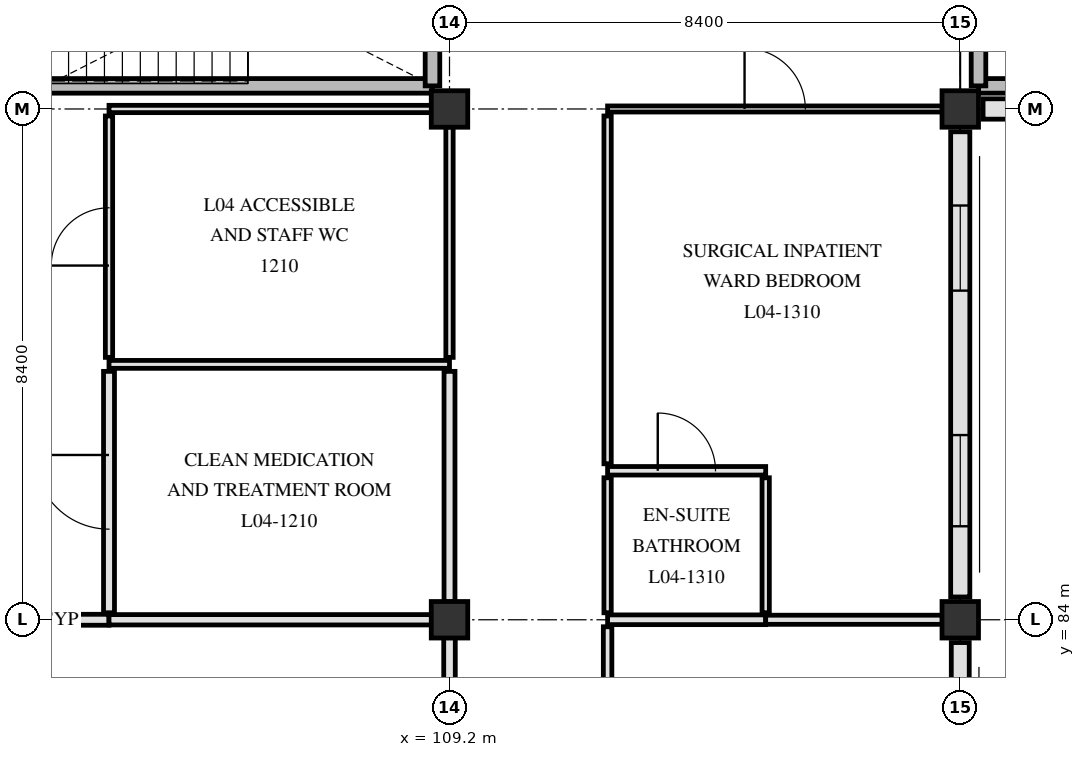
"""IFC4 building model, lengths in metres.
Left out: names, types, materials, properties, quantities, classifications, styles, units other than length and angle.
Written with IfcOpenShell. Run it as: python <this file> out.ifc"""

import sys

from ifc_helpers import new_model, si_unit, direction, frame, frame_2d, origin, origin_2d, place, context, subcontext, project, spatial, rectangle, extrude, element, fill, save


model = new_model("IFC4")
c1 = context("Model", 3, precision=1e-05, world=origin(), true_north=direction((0.0, 1.0)))
c2 = subcontext(c1, "Body", "Model", "MODEL_VIEW")
j1 = project(units=[si_unit("LENGTHUNIT", "METRE"), si_unit("PLANEANGLEUNIT", "RADIAN")], contexts=[c1])
p1 = place(None, origin())
s1 = spatial("IfcSite", under=j1, at=p1, CompositionType="ELEMENT")
p2 = place(p1, origin())
s2 = spatial("IfcBuilding", under=s1, at=p2, CompositionType="ELEMENT")
p3 = place(p2, frame((0.0, 0.0, 18.6)))
s3 = spatial("IfcBuildingStorey", under=s2, at=p3, CompositionType="ELEMENT", Elevation=18.6)
for number, where, z_axis, x_axis in (
    (1, (109.2, 84.0, 0.0), (0.0, 0.0, 1.0), (1.0, 0.0, 0.0)),
    (2, (109.2, 92.4, 0.0), (0.0, 0.0, 1.0), (1.0, 0.0, 0.0)),
    (3, (117.6, 84.0, 0.0), (0.0, 0.0, 1.0), (1.0, 0.0, 0.0)),
    (4, (117.6, 92.4, 0.0), (0.0, 0.0, 1.0), (1.0, 0.0, 0.0)),
):
    element("IfcColumn", number, at=place(p3, frame(where, z_axis=z_axis, x_axis=x_axis)), inside=s3, PredefinedType="COLUMN", context=c2, shape_type="SweptSolid", body=[
        extrude(rectangle(XDim=0.6, YDim=0.6, at=origin_2d()), origin(), (0.0, 0.0, 1.0), 3.9),
    ])
p4 = place(p3, frame((125.625, 92.4, 0.0), z_axis=(0.0, 0.0, 1.0), x_axis=(-1.0, 0.0, 0.0)))
e5 = element("IfcWall", 5, at=p4, inside=s3, PredefinedType="SOLIDWALL", context=c2, shape_type="SweptSolid", body=[
    extrude(rectangle(XDim=7.65, YDim=0.335, at=frame_2d((3.825, 0.0))), origin(), (0.0, 0.0, 1.0), 3.31),
])
p5 = place(p4, frame((1.312, 0.0, 0.85)))
e6 = element("IfcOpeningElement", 6, at=p5, cuts=e5, PredefinedType="OPENING", context=c2, shape_type="SweptSolid", body=[
    extrude(rectangle(XDim=1.2, YDim=1.66, at=frame_2d((0.6, 0.83))), frame((0.0, 0.177, 0.0), z_axis=(0.0, -1.0, 0.0), x_axis=(1.0, 0.0, 0.0)), (0.0, 0.0, 1.0), 0.355),
])
p6 = place(p4, frame((5.087, 0.0, 0.85)))
e7 = element("IfcOpeningElement", 7, at=p6, cuts=e5, PredefinedType="OPENING", context=c2, shape_type="SweptSolid", body=[
    extrude(rectangle(XDim=1.3, YDim=1.66, at=frame_2d((0.65, 0.83))), frame((0.0, 0.177, 0.0), z_axis=(0.0, -1.0, 0.0), x_axis=(1.0, 0.0, 0.0)), (0.0, 0.0, 1.0), 0.355),
])
p7 = place(p3, frame((117.6, 92.025, 0.0), z_axis=(0.0, 0.0, 1.0), x_axis=(0.0, -1.0, 0.0)))
e8 = element("IfcWall", 8, at=p7, inside=s3, PredefinedType="SOLIDWALL", context=c2, shape_type="SweptSolid", body=[
    extrude(rectangle(XDim=7.65, YDim=0.315, at=frame_2d((3.825, 0.0))), origin(), (0.0, 0.0, 1.0), 3.31),
])
p8 = place(p7, frame((1.212, 0.0, 0.85)))
e9 = element("IfcOpeningElement", 9, at=p8, cuts=e8, PredefinedType="OPENING", context=c2, shape_type="SweptSolid", body=[
    extrude(rectangle(XDim=1.4, YDim=1.66, at=frame_2d((0.7, 0.83))), frame((0.0, 0.167, 0.0), z_axis=(0.0, -1.0, 0.0), x_axis=(1.0, 0.0, 0.0)), (0.0, 0.0, 1.0), 0.335),
])
p9 = place(p7, frame((4.988, 0.0, 0.85)))
e10 = element("IfcOpeningElement", 10, at=p9, cuts=e8, PredefinedType="OPENING", context=c2, shape_type="SweptSolid", body=[
    extrude(rectangle(XDim=1.5, YDim=1.66, at=frame_2d((0.75, 0.83))), frame((0.0, 0.167, 0.0), z_axis=(0.0, -1.0, 0.0), x_axis=(1.0, 0.0, 0.0)), (0.0, 0.0, 1.0), 0.335),
])
p10 = place(p3, frame((117.6, 83.625, 0.0), z_axis=(0.0, 0.0, 1.0), x_axis=(0.0, -1.0, 0.0)))
e11 = element("IfcWall", 11, at=p10, inside=s3, PredefinedType="SOLIDWALL", context=c2, shape_type="SweptSolid", body=[
    extrude(rectangle(XDim=7.65, YDim=0.295, at=frame_2d((3.825, 0.0))), origin(), (0.0, 0.0, 1.0), 3.31),
])
p11 = place(p10, frame((1.113, 0.0, 0.85)))
e12 = element("IfcOpeningElement", 12, at=p11, cuts=e11, PredefinedType="OPENING", context=c2, shape_type="SweptSolid", body=[
    extrude(rectangle(XDim=1.6, YDim=1.66, at=frame_2d((0.8, 0.83))), frame((0.0, 0.157, 0.0), z_axis=(0.0, -1.0, 0.0), x_axis=(1.0, 0.0, 0.0)), (0.0, 0.0, 1.0), 0.315),
])
p12 = place(p10, frame((4.887, 0.0, 0.85)))
e13 = element("IfcOpeningElement", 13, at=p12, cuts=e11, PredefinedType="OPENING", context=c2, shape_type="SweptSolid", body=[
    extrude(rectangle(XDim=1.7, YDim=1.66, at=frame_2d((0.85, 0.83))), frame((0.0, 0.157, 0.0), z_axis=(0.0, -1.0, 0.0), x_axis=(1.0, 0.0, 0.0)), (0.0, 0.0, 1.0), 0.315),
])
p13 = place(p3, frame((101.1, 92.78, 0.0), z_axis=(0.0, 0.0, 1.0), x_axis=(1.0, 0.0, 0.0)))
e14 = element("IfcWall", 14, at=p13, inside=s3, PredefinedType="SHEAR", context=c2, shape_type="SweptSolid", body=[
    extrude(rectangle(XDim=7.82, YDim=0.24, at=frame_2d((3.91, 0.0))), origin(), (0.0, 0.0, 1.0), 3.62),
])
p14 = place(p3, frame((108.92, 92.78, 0.0), z_axis=(0.0, 0.0, 1.0), x_axis=(0.0, 1.0, 0.0)))
e15 = element("IfcWall", 15, at=p14, inside=s3, PredefinedType="SHEAR", context=c2, shape_type="SweptSolid", body=[
    extrude(rectangle(XDim=3.32, YDim=0.24, at=frame_2d((1.66, 0.0))), origin(), (0.0, 0.0, 1.0), 3.62),
])
p15 = place(p3, frame((117.9, 92.78, 0.0), z_axis=(0.0, 0.0, 1.0), x_axis=(1.0, 0.0, 0.0)))
e16 = element("IfcWall", 16, at=p15, inside=s3, PredefinedType="SHEAR", context=c2, shape_type="SweptSolid", body=[
    extrude(rectangle(XDim=7.82, YDim=0.24, at=frame_2d((3.91, 0.0))), origin(), (0.0, 0.0, 1.0), 3.62),
])
p16 = place(p3, frame((117.9, 92.78, 0.0), z_axis=(0.0, 0.0, 1.0), x_axis=(0.0, 1.0, 0.0)))
e17 = element("IfcWall", 17, at=p16, inside=s3, PredefinedType="SHEAR", context=c2, shape_type="SweptSolid", body=[
    extrude(rectangle(XDim=3.32, YDim=0.24, at=frame_2d((1.66, 0.0))), origin(), (0.0, 0.0, 1.0), 3.62),
])
p17 = place(p3, frame((101.095, 84.0, 0.0), z_axis=(0.0, 0.0, 1.0), x_axis=(1.0, 0.0, 0.0)))
e18 = element("IfcWall", 18, at=p17, inside=s3, PredefinedType="PARTITIONING", context=c2, shape_type="SweptSolid", body=[
    extrude(rectangle(XDim=2.505, YDim=0.18, at=frame_2d((1.252, 0.0))), origin(), (0.0, 0.0, 1.0), 3.16),
])
p18 = place(p3, frame((103.6, 84.0, 0.0), z_axis=(0.0, 0.0, 1.0), x_axis=(1.0, 0.0, 0.0)))
e19 = element("IfcWall", 19, at=p18, inside=s3, PredefinedType="PARTITIONING", context=c2, shape_type="SweptSolid", body=[
    extrude(rectangle(XDim=5.305, YDim=0.17, at=frame_2d((2.652, 0.0))), origin(), (0.0, 0.0, 1.0), 3.16),
])
p19 = place(p3, frame((111.8, 84.0, 0.0), z_axis=(0.0, 0.0, 1.0), x_axis=(1.0, 0.0, 0.0)))
e20 = element("IfcWall", 20, at=p19, inside=s3, PredefinedType="PARTITIONING", context=c2, shape_type="SweptSolid", body=[
    extrude(rectangle(XDim=2.6, YDim=0.16, at=frame_2d((1.3, 0.0))), origin(), (0.0, 0.0, 1.0), 3.16),
])
p20 = place(p3, frame((114.4, 84.0, 0.0), z_axis=(0.0, 0.0, 1.0), x_axis=(1.0, 0.0, 0.0)))
e21 = element("IfcWall", 21, at=p20, inside=s3, PredefinedType="PARTITIONING", context=c2, shape_type="SweptSolid", body=[
    extrude(rectangle(XDim=2.905, YDim=0.15, at=frame_2d((1.453, 0.0))), origin(), (0.0, 0.0, 1.0), 3.16),
])
p21 = place(p3, frame((111.8, 86.45, 0.0), z_axis=(0.0, 0.0, 1.0), x_axis=(1.0, 0.0, 0.0)))
e22 = element("IfcWall", 22, at=p21, inside=s3, PredefinedType="PARTITIONING", context=c2, shape_type="SweptSolid", body=[
    extrude(rectangle(XDim=2.6, YDim=0.14, at=frame_2d((1.3, 0.0))), origin(), (0.0, 0.0, 1.0), 3.61),
])
p22 = place(p21, frame((0.825, 0.0, 0.0)))
e23 = element("IfcOpeningElement", 23, at=p22, cuts=e22, PredefinedType="OPENING", context=c2, shape_type="SweptSolid", body=[
    extrude(rectangle(XDim=0.95, YDim=2.1, at=frame_2d((0.475, 1.05))), frame((0.0, 0.08, 0.0), z_axis=(0.0, -1.0, 0.0), x_axis=(1.0, 0.0, 0.0)), (0.0, 0.0, 1.0), 0.16),
])
p23 = place(p3, frame((103.6, 88.2, 0.0), z_axis=(0.0, 0.0, 1.0), x_axis=(1.0, 0.0, 0.0)))
e24 = element("IfcWall", 24, at=p23, inside=s3, PredefinedType="PARTITIONING", context=c2, shape_type="SweptSolid", body=[
    extrude(rectangle(XDim=5.6, YDim=0.13, at=frame_2d((2.8, 0.0))), origin(), (0.0, 0.0, 1.0), 3.26),
])
p24 = place(p3, frame((103.6, 92.4, 0.0), z_axis=(0.0, 0.0, 1.0), x_axis=(1.0, 0.0, 0.0)))
e25 = element("IfcWall", 25, at=p24, inside=s3, PredefinedType="PARTITIONING", context=c2, shape_type="SweptSolid", body=[
    extrude(rectangle(XDim=5.305, YDim=0.12, at=frame_2d((2.652, 0.0))), origin(), (0.0, 0.0, 1.0), 3.16),
])
p25 = place(p3, frame((111.8, 92.4, 0.0), z_axis=(0.0, 0.0, 1.0), x_axis=(1.0, 0.0, 0.0)))
e26 = element("IfcWall", 26, at=p25, inside=s3, PredefinedType="PARTITIONING", context=c2, shape_type="SweptSolid", body=[
    extrude(rectangle(XDim=5.505, YDim=0.1, at=frame_2d((2.752, 0.0))), origin(), (0.0, 0.0, 1.0), 3.16),
])
p26 = place(p25, frame((2.252, 0.0, 0.0)))
e27 = element("IfcOpeningElement", 27, at=p26, cuts=e26, PredefinedType="OPENING", context=c2, shape_type="SweptSolid", body=[
    extrude(rectangle(XDim=1.0, YDim=2.15, at=frame_2d((0.5, 1.075))), frame((0.0, 0.06, 0.0), z_axis=(0.0, -1.0, 0.0), x_axis=(1.0, 0.0, 0.0)), (0.0, 0.0, 1.0), 0.12),
])
p27 = place(p3, frame((103.6, 84.115, 0.0), z_axis=(0.0, 0.0, 1.0), x_axis=(0.0, 1.0, 0.0)))
e28 = element("IfcWall", 28, at=p27, inside=s3, PredefinedType="PARTITIONING", context=c2, shape_type="SweptSolid", body=[
    extrude(rectangle(XDim=3.97, YDim=0.18, at=frame_2d((1.985, 0.0))), origin(), (0.0, 0.0, 1.0), 3.31),
])
p28 = place(p27, frame((1.375, 0.0, 0.0)))
e29 = element("IfcOpeningElement", 29, at=p28, cuts=e28, PredefinedType="OPENING", context=c2, shape_type="SweptSolid", body=[
    extrude(rectangle(XDim=1.22, YDim=2.18, at=frame_2d((0.61, 1.09))), frame((0.0, 0.1, 0.0), z_axis=(0.0, -1.0, 0.0), x_axis=(1.0, 0.0, 0.0)), (0.0, 0.0, 1.0), 0.2),
])
p29 = place(p3, frame((103.6, 88.315, 0.0), z_axis=(0.0, 0.0, 1.0), x_axis=(0.0, 1.0, 0.0)))
e30 = element("IfcWall", 30, at=p29, inside=s3, PredefinedType="PARTITIONING", context=c2, shape_type="SweptSolid", body=[
    extrude(rectangle(XDim=3.97, YDim=0.12, at=frame_2d((1.985, 0.0))), origin(), (0.0, 0.0, 1.0), 3.31),
])
p30 = place(p29, frame((1.51, 0.0, 0.0)))
e31 = element("IfcOpeningElement", 31, at=p30, cuts=e30, PredefinedType="OPENING", context=c2, shape_type="SweptSolid", body=[
    extrude(rectangle(XDim=0.95, YDim=2.1, at=frame_2d((0.475, 1.05))), frame((0.0, 0.07, 0.0), z_axis=(0.0, -1.0, 0.0), x_axis=(1.0, 0.0, 0.0)), (0.0, 0.0, 1.0), 0.14),
])
p31 = place(p3, frame((109.2, 78.315, 0.0), z_axis=(0.0, 0.0, 1.0), x_axis=(0.0, 1.0, 0.0)))
e32 = element("IfcWall", 32, at=p31, inside=s3, PredefinedType="PARTITIONING", context=c2, shape_type="SweptSolid", body=[
    extrude(rectangle(XDim=5.39, YDim=0.19, at=frame_2d((2.695, 0.0))), origin(), (0.0, 0.0, 1.0), 3.26),
])
p32 = place(p3, frame((109.2, 84.295, 0.0), z_axis=(0.0, 0.0, 1.0), x_axis=(0.0, 1.0, 0.0)))
e33 = element("IfcWall", 33, at=p32, inside=s3, PredefinedType="PARTITIONING", context=c2, shape_type="SweptSolid", body=[
    extrude(rectangle(XDim=3.79, YDim=0.18, at=frame_2d((1.895, 0.0))), origin(), (0.0, 0.0, 1.0), 3.26),
])
p33 = place(p3, frame((109.2, 88.315, 0.0), z_axis=(0.0, 0.0, 1.0), x_axis=(0.0, 1.0, 0.0)))
e34 = element("IfcWall", 34, at=p33, inside=s3, PredefinedType="PARTITIONING", context=c2, shape_type="SweptSolid", body=[
    extrude(rectangle(XDim=3.79, YDim=0.12, at=frame_2d((1.895, 0.0))), origin(), (0.0, 0.0, 1.0), 3.26),
])
p34 = place(p3, frame((111.8, 78.315, 0.0), z_axis=(0.0, 0.0, 1.0), x_axis=(0.0, 1.0, 0.0)))
e35 = element("IfcWall", 35, at=p34, inside=s3, PredefinedType="PARTITIONING", context=c2, shape_type="SweptSolid", body=[
    extrude(rectangle(XDim=5.57, YDim=0.14, at=frame_2d((2.785, 0.0))), origin(), (0.0, 0.0, 1.0), 3.31),
])
p35 = place(p3, frame((111.8, 84.115, 0.0), z_axis=(0.0, 0.0, 1.0), x_axis=(0.0, 1.0, 0.0)))
e36 = element("IfcWall", 36, at=p35, inside=s3, PredefinedType="PARTITIONING", context=c2, shape_type="SweptSolid", body=[
    extrude(rectangle(XDim=2.22, YDim=0.12, at=frame_2d((1.11, 0.0))), origin(), (0.0, 0.0, 1.0), 3.61),
])
p36 = place(p3, frame((111.8, 86.565, 0.0), z_axis=(0.0, 0.0, 1.0), x_axis=(0.0, 1.0, 0.0)))
e37 = element("IfcWall", 37, at=p36, inside=s3, PredefinedType="PARTITIONING", context=c2, shape_type="SweptSolid", body=[
    extrude(rectangle(XDim=5.72, YDim=0.12, at=frame_2d((2.86, 0.0))), origin(), (0.0, 0.0, 1.0), 3.31),
])
p37 = place(p3, frame((114.4, 84.115, 0.0), z_axis=(0.0, 0.0, 1.0), x_axis=(0.0, 1.0, 0.0)))
e38 = element("IfcWall", 38, at=p37, inside=s3, PredefinedType="PARTITIONING", context=c2, shape_type="SweptSolid", body=[
    extrude(rectangle(XDim=2.22, YDim=0.12, at=frame_2d((1.11, 0.0))), origin(), (0.0, 0.0, 1.0), 3.61),
])
p38 = place(p8, origin())
e39 = element("IfcWindow", 39, at=p38, inside=s3, PartitioningType="SINGLE_PANEL", PredefinedType="WINDOW", context=c2, shape_type="SweptSolid", body=[
    extrude(rectangle(XDim=1.4, YDim=1.66, at=frame_2d((0.7, 0.83))), frame((0.0, 0.03, 0.0), z_axis=(0.0, -1.0, 0.0), x_axis=(1.0, 0.0, 0.0)), (0.0, 0.0, 1.0), 0.06),
])
fill(e9, e39)
p39 = place(p9, origin())
e40 = element("IfcWindow", 40, at=p39, inside=s3, PartitioningType="SINGLE_PANEL", PredefinedType="WINDOW", context=c2, shape_type="SweptSolid", body=[
    extrude(rectangle(XDim=1.5, YDim=1.66, at=frame_2d((0.75, 0.83))), frame((0.0, 0.03, 0.0), z_axis=(0.0, -1.0, 0.0), x_axis=(1.0, 0.0, 0.0)), (0.0, 0.0, 1.0), 0.06),
])
fill(e10, e40)
p40 = place(p28, origin())
e41 = element("IfcDoor", 41, at=p40, inside=s3, OperationType="SINGLE_SWING_RIGHT", PredefinedType="DOOR", context=c2, shape_type="SweptSolid", body=[
    extrude(rectangle(XDim=1.22, YDim=2.18, at=frame_2d((0.61, 1.09))), frame((0.0, 0.025, 0.0), z_axis=(0.0, -1.0, 0.0), x_axis=(1.0, 0.0, 0.0)), (0.0, 0.0, 1.0), 0.05),
])
fill(e29, e41)
p41 = place(p30, origin())
e42 = element("IfcDoor", 42, at=p41, inside=s3, OperationType="SINGLE_SWING_LEFT", PredefinedType="DOOR", context=c2, shape_type="SweptSolid", body=[
    extrude(rectangle(XDim=0.95, YDim=2.1, at=frame_2d((0.475, 1.05))), frame((0.0, 0.025, 0.0), z_axis=(0.0, -1.0, 0.0), x_axis=(1.0, 0.0, 0.0)), (0.0, 0.0, 1.0), 0.05),
])
fill(e31, e42)
p42 = place(p26, origin())
e43 = element("IfcDoor", 43, at=p42, inside=s3, OperationType="SINGLE_SWING_LEFT", PredefinedType="DOOR", context=c2, shape_type="SweptSolid", body=[
    extrude(rectangle(XDim=1.0, YDim=2.15, at=frame_2d((0.5, 1.075))), frame((0.0, 0.025, 0.0), z_axis=(0.0, -1.0, 0.0), x_axis=(1.0, 0.0, 0.0)), (0.0, 0.0, 1.0), 0.05),
])
fill(e27, e43)
p43 = place(p22, origin())
e44 = element("IfcDoor", 44, at=p43, inside=s3, OperationType="SINGLE_SWING_LEFT", PredefinedType="DOOR", context=c2, shape_type="SweptSolid", body=[
    extrude(rectangle(XDim=0.95, YDim=2.1, at=frame_2d((0.475, 1.05))), frame((0.0, 0.025, 0.0), z_axis=(0.0, -1.0, 0.0), x_axis=(1.0, 0.0, 0.0)), (0.0, 0.0, 1.0), 0.05),
])
fill(e23, e44)
save(model, sys.argv[1])
